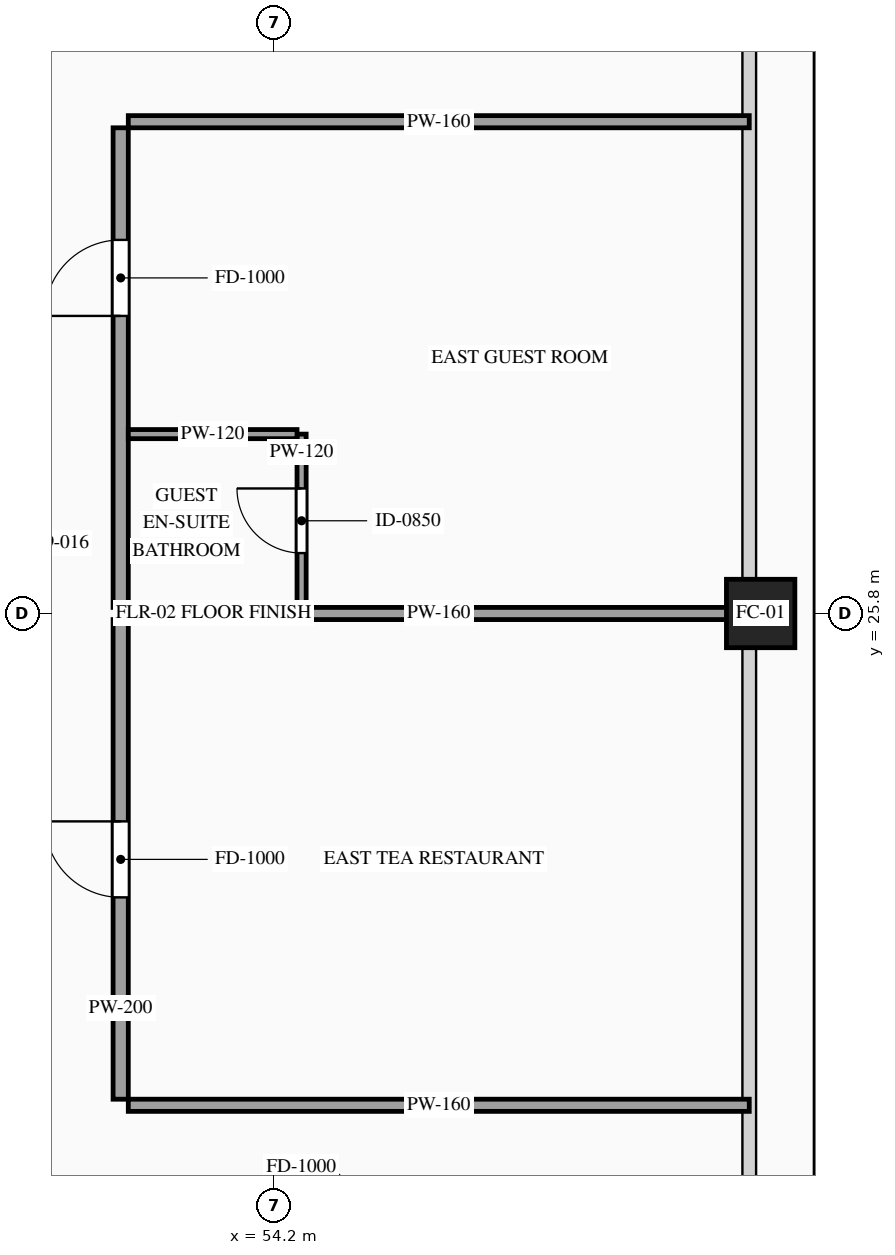
"""IFC4 building model, lengths in metres.
Left out: names, types, materials, properties, quantities, classifications, styles, units other than length and angle.
Written with IfcOpenShell. Run it as: python <this file> out.ifc"""

import sys

from ifc_helpers import new_model, si_unit, direction, frame, frame_2d, origin, origin_2d, place, context, subcontext, project, spatial, rectangle, hollow_rectangle, extrude, source, transform, mapped, element, fill, save


model = new_model("IFC4")
c1 = context("Model", 3, precision=1e-05, world=origin(), true_north=direction((0.0, 1.0)))
c2 = subcontext(c1, "Body", "Model", "MODEL_VIEW")
j1 = project(units=[si_unit("LENGTHUNIT", "METRE"), si_unit("PLANEANGLEUNIT", "RADIAN")], contexts=[c1])
p1 = place(None, origin())
s1 = spatial("IfcSite", under=j1, at=p1, CompositionType="ELEMENT")
p2 = place(p1, origin())
s2 = spatial("IfcBuilding", under=s1, at=p2, CompositionType="ELEMENT")
p3 = place(p2, frame((0.0, 0.0, 148.8)))
s3 = spatial("IfcBuildingStorey", under=s2, at=p3, CompositionType="ELEMENT", Elevation=148.8)
m1 = source(origin(), c2, "Body", "SweptSolid", [
    extrude(hollow_rectangle(XDim=0.9, YDim=0.9, WallThickness=0.042, at=origin_2d()), origin(), (0.0, 0.0, 1.0), 3.6),
])
p4 = place(p3, frame((60.6, 25.8, 0.0), z_axis=(0.0, 0.0, 1.0), x_axis=(1.0, 0.0, 0.0)))
e1 = element("IfcColumn", 1, at=p4, inside=s3, PredefinedType="COLUMN", context=c2, shape_type="MappedRepresentation", body=[
    mapped(m1, transform((0.0, 0.0, 0.0), scale=1.0)),
])
p5 = place(p3, frame((52.18, 19.41, 0.0), z_axis=(0.0, 0.0, 1.0), x_axis=(0.0, 1.0, 0.0)))
e2 = element("IfcWall", 2, at=p5, inside=s3, PredefinedType="PARTITIONING", context=c2, shape_type="SweptSolid", body=[
    extrude(rectangle(XDim=6.31, YDim=0.2, at=frame_2d((3.155, 0.0))), origin(), (0.0, 0.0, 1.0), 3.38),
])
p6 = place(p5, frame((2.655, 0.0, 0.0)))
e3 = element("IfcOpeningElement", 3, at=p6, cuts=e2, PredefinedType="OPENING", context=c2, shape_type="SweptSolid", body=[
    extrude(rectangle(XDim=1.0, YDim=2.2, at=frame_2d((0.5, 1.1))), frame((0.0, 0.115, 0.0), z_axis=(0.0, -1.0, 0.0), x_axis=(1.0, 0.0, 0.0)), (0.0, 0.0, 1.0), 0.23),
])
m2 = source(origin(), c2, "Body", "SweptSolid", [
    extrude(rectangle(XDim=8.17, YDim=0.16, at=frame_2d((4.085, 0.0))), origin(), (0.0, 0.0, 1.0), 2.675),
])
p7 = place(p3, frame((52.28, 25.8, 0.0), z_axis=(0.0, 0.0, 1.0), x_axis=(1.0, 0.0, 0.0)))
e4 = element("IfcWall", 4, at=p7, inside=s3, PredefinedType="PARTITIONING", context=c2, shape_type="MappedRepresentation", body=[
    mapped(m2, transform((0.0, 0.0, 0.0), scale=1.0)),
])
m3 = source(origin(), c2, "Body", "SweptSolid", [
    extrude(rectangle(XDim=8.17, YDim=0.16, at=frame_2d((4.085, 0.0))), origin(), (0.0, 0.0, 1.0), 2.875),
])
p8 = place(p3, frame((52.28, 19.33, 0.0), z_axis=(0.0, 0.0, 1.0), x_axis=(1.0, 0.0, 0.0)))
e5 = element("IfcWall", 5, at=p8, inside=s3, PredefinedType="PARTITIONING", context=c2, shape_type="MappedRepresentation", body=[
    mapped(m3, transform((0.0, 0.0, 0.0), scale=1.0)),
])
p9 = place(p3, frame((52.18, 25.88, 0.0), z_axis=(0.0, 0.0, 1.0), x_axis=(0.0, 1.0, 0.0)))
e6 = element("IfcWall", 6, at=p9, inside=s3, PredefinedType="PARTITIONING", context=c2, shape_type="SweptSolid", body=[
    extrude(rectangle(XDim=6.31, YDim=0.2, at=frame_2d((3.155, 0.0))), origin(), (0.0, 0.0, 1.0), 3.38),
])
p10 = place(p9, frame((3.835, 0.0, 0.0)))
e7 = element("IfcOpeningElement", 7, at=p10, cuts=e6, PredefinedType="OPENING", context=c2, shape_type="SweptSolid", body=[
    extrude(rectangle(XDim=1.0, YDim=2.2, at=frame_2d((0.5, 1.1))), frame((0.0, 0.115, 0.0), z_axis=(0.0, -1.0, 0.0), x_axis=(1.0, 0.0, 0.0)), (0.0, 0.0, 1.0), 0.23),
])
p11 = place(p3, frame((52.28, 32.27, 0.0), z_axis=(0.0, 0.0, 1.0), x_axis=(1.0, 0.0, 0.0)))
e8 = element("IfcWall", 8, at=p11, inside=s3, PredefinedType="PARTITIONING", context=c2, shape_type="MappedRepresentation", body=[
    mapped(m3, transform((0.0, 0.0, 0.0), scale=1.0)),
])
p12 = place(p3, frame((54.56, 25.88, 0.0), z_axis=(0.0, 0.0, 1.0), x_axis=(0.0, 1.0, 0.0)))
e9 = element("IfcWall", 9, at=p12, inside=s3, PredefinedType="PARTITIONING", context=c2, shape_type="SweptSolid", body=[
    extrude(rectangle(XDim=2.28, YDim=0.12, at=frame_2d((1.14, 0.0))), origin(), (0.0, 0.0, 1.0), 3.38),
])
p13 = place(p12, frame((0.715, 0.0, 0.0)))
e10 = element("IfcOpeningElement", 10, at=p13, cuts=e9, PredefinedType="OPENING", context=c2, shape_type="SweptSolid", body=[
    extrude(rectangle(XDim=0.85, YDim=2.1, at=frame_2d((0.425, 1.05))), frame((0.0, 0.075, 0.0), z_axis=(0.0, -1.0, 0.0), x_axis=(1.0, 0.0, 0.0)), (0.0, 0.0, 1.0), 0.15),
])
m4 = source(origin(), c2, "Body", "SweptSolid", [
    extrude(rectangle(XDim=2.22, YDim=0.12, at=frame_2d((1.11, 0.0))), origin(), (0.0, 0.0, 1.0), 3.38),
])
p14 = place(p3, frame((52.28, 28.16, 0.0), z_axis=(0.0, 0.0, 1.0), x_axis=(1.0, 0.0, 0.0)))
e11 = element("IfcWall", 11, at=p14, inside=s3, PredefinedType="PARTITIONING", context=c2, shape_type="MappedRepresentation", body=[
    mapped(m4, transform((0.0, 0.0, 0.0), scale=1.0)),
])
m5 = source(origin(), c2, "Body", "SweptSolid", [
    extrude(rectangle(XDim=1.0, YDim=2.2, at=frame_2d((0.5, 1.1))), frame((0.0, 0.025, 0.0), z_axis=(0.0, -1.0, 0.0), x_axis=(1.0, 0.0, 0.0)), (0.0, 0.0, 1.0), 0.05),
])
p15 = place(p6, origin())
e12 = element("IfcDoor", 12, at=p15, inside=s3, OperationType="SINGLE_SWING_RIGHT", PredefinedType="DOOR", context=c2, shape_type="MappedRepresentation", body=[
    mapped(m5, transform((0.0, 0.0, 0.0), scale=1.0)),
])
fill(e3, e12)
p16 = place(p10, origin())
e13 = element("IfcDoor", 13, at=p16, inside=s3, OperationType="SINGLE_SWING_LEFT", PredefinedType="DOOR", context=c2, shape_type="MappedRepresentation", body=[
    mapped(m5, transform((0.0, 0.0, 0.0), scale=1.0)),
])
fill(e7, e13)
m6 = source(origin(), c2, "Body", "SweptSolid", [
    extrude(rectangle(XDim=0.85, YDim=2.1, at=frame_2d((0.425, 1.05))), frame((0.0, 0.025, 0.0), z_axis=(0.0, -1.0, 0.0), x_axis=(1.0, 0.0, 0.0)), (0.0, 0.0, 1.0), 0.05),
])
p17 = place(p13, origin())
e14 = element("IfcDoor", 14, at=p17, inside=s3, OperationType="SINGLE_SWING_RIGHT", PredefinedType="DOOR", context=c2, shape_type="MappedRepresentation", body=[
    mapped(m6, transform((0.0, 0.0, 0.0), scale=1.0)),
])
fill(e10, e14)
save(model, sys.argv[1])
